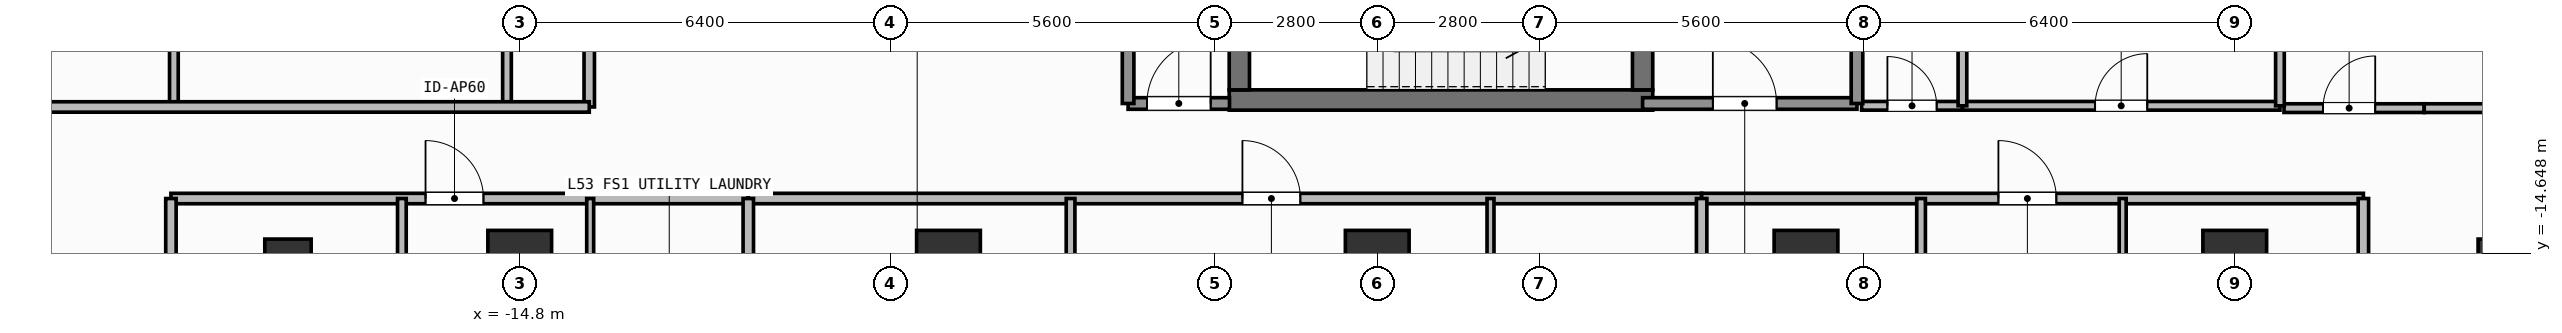
"""IFC4 building model, lengths in metres.
Left out: names, types, materials, properties, quantities, classifications, styles, units other than length and angle.
Written with IfcOpenShell. Run it as: python <this file> out.ifc"""

import sys

from ifc_helpers import new_model, si_unit, direction, frame, frame_2d, origin, origin_2d, place, context, subcontext, project, spatial, rectangle, hollow_rectangle, extrude, element, fill, save


model = new_model("IFC4")
c1 = context("Model", 3, precision=1e-05, world=origin(), true_north=direction((0.0, 1.0)))
c2 = subcontext(c1, "Body", "Model", "MODEL_VIEW")
j1 = project(units=[si_unit("LENGTHUNIT", "METRE"), si_unit("PLANEANGLEUNIT", "RADIAN")], contexts=[c1])
p1 = place(None, origin())
s1 = spatial("IfcSite", under=j1, at=p1, CompositionType="ELEMENT")
p2 = place(p1, origin())
s2 = spatial("IfcBuilding", under=s1, at=p2, CompositionType="ELEMENT")
p3 = place(p2, frame((0.0, 0.0, 215.7)))
s3 = spatial("IfcBuildingStorey", under=s2, at=p3, CompositionType="ELEMENT", Elevation=215.7)
p4 = place(p3, frame((-2.555, -12.0, 0.0), z_axis=(0.0, 0.0, 1.0), x_axis=(1.0, 0.0, 0.0)))
e1 = element("IfcWall", 1, at=p4, inside=s3, PredefinedType="SHEAR", context=c2, shape_type="SweptSolid", body=[
    extrude(rectangle(XDim=7.31, YDim=0.35, at=frame_2d((3.655, 0.0))), origin(), (0.0, 0.0, 1.0), 3.9),
])
p5 = place(p3, frame((-2.38, -11.825, 0.0), z_axis=(0.0, 0.0, 1.0), x_axis=(0.0, 1.0, 0.0)))
e2 = element("IfcWall", 2, at=p5, inside=s3, PredefinedType="SHEAR", context=c2, shape_type="SweptSolid", body=[
    extrude(rectangle(XDim=2.925, YDim=0.35, at=frame_2d((1.462, 0.0))), origin(), (0.0, 0.0, 1.0), 3.9),
])
p6 = place(p3, frame((4.58, -8.9, 0.0), z_axis=(0.0, 0.0, 1.0), x_axis=(0.0, -1.0, 0.0)))
e3 = element("IfcWall", 3, at=p6, inside=s3, PredefinedType="SHEAR", context=c2, shape_type="SweptSolid", body=[
    extrude(rectangle(XDim=2.925, YDim=0.35, at=frame_2d((1.462, 0.0))), origin(), (0.0, 0.0, 1.0), 3.9),
])
p7 = place(p6, frame((0.913, 0.0, 0.0)))
e4 = element("IfcOpeningElement", 4, at=p7, cuts=e3, PredefinedType="OPENING", context=c2, shape_type="SweptSolid", body=[
    extrude(rectangle(XDim=1.1, YDim=2.15, at=frame_2d((0.55, 1.075))), frame((0.0, 0.185, 0.0), z_axis=(0.0, -1.0, 0.0), x_axis=(1.0, 0.0, 0.0)), (0.0, 0.0, 1.0), 0.37),
])
for number, where, z_axis, x_axis in (
    (5, (-14.8, -14.8, 0.0), (0.0, 0.0, 1.0), (1.0, 0.0, 0.0)),
    (6, (-7.4, -14.8, 0.0), (0.0, 0.0, 1.0), (1.0, 0.0, 0.0)),
    (7, (0.0, -14.8, 0.0), (0.0, 0.0, 1.0), (1.0, 0.0, 0.0)),
    (8, (7.4, -14.8, 0.0), (0.0, 0.0, 1.0), (1.0, 0.0, 0.0)),
    (9, (14.8, -14.8, 0.0), (0.0, 0.0, 1.0), (1.0, 0.0, 0.0)),
):
    element("IfcColumn", number, at=place(p3, frame(where, z_axis=z_axis, x_axis=x_axis)), inside=s3, PredefinedType="COLUMN", context=c2, shape_type="SweptSolid", body=[
        extrude(rectangle(XDim=1.1, YDim=1.1, at=origin_2d()), origin(), (0.0, 0.0, 1.0), 3.9),
    ])
for number, where, z_axis, x_axis in (
    (10, (-18.8, -14.8, 0.0), (0.0, 0.0, 1.0), (1.0, 0.0, 0.0)),
    (11, (19.4, -14.8, 0.0), (0.0, 0.0, 1.0), (1.0, 0.0, 0.0)),
):
    element("IfcColumn", number, at=place(p3, frame(where, z_axis=z_axis, x_axis=x_axis)), inside=s3, PredefinedType="COLUMN", context=c2, shape_type="SweptSolid", body=[
        extrude(hollow_rectangle(XDim=0.8, YDim=0.8, WallThickness=0.036, at=origin_2d()), origin(), (0.0, 0.0, 1.0), 3.9),
    ])
p8 = place(p3, frame((4.58, -12.06, 0.0), z_axis=(0.0, 0.0, 1.0), x_axis=(1.0, 0.0, 0.0)))
e12 = element("IfcWall", 12, at=p8, inside=s3, PredefinedType="SOLIDWALL", context=c2, shape_type="SweptSolid", body=[
    extrude(rectangle(XDim=3.7, YDim=0.2, at=frame_2d((1.85, 0.0))), origin(), (0.0, 0.0, 1.0), 3.62),
])
p9 = place(p8, frame((1.212, 0.0, 0.0)))
e13 = element("IfcOpeningElement", 13, at=p9, cuts=e12, PredefinedType="OPENING", context=c2, shape_type="SweptSolid", body=[
    extrude(rectangle(XDim=1.1, YDim=2.15, at=frame_2d((0.55, 1.075))), frame((0.0, 0.11, 0.0), z_axis=(0.0, -1.0, 0.0), x_axis=(1.0, 0.0, 0.0)), (0.0, 0.0, 1.0), 0.22),
])
p10 = place(p3, frame((-4.3, -12.06, 0.0), z_axis=(0.0, 0.0, 1.0), x_axis=(1.0, 0.0, 0.0)))
e14 = element("IfcWall", 14, at=p10, inside=s3, PredefinedType="SOLIDWALL", context=c2, shape_type="SweptSolid", body=[
    extrude(rectangle(XDim=1.75, YDim=0.2, at=frame_2d((0.875, 0.0))), origin(), (0.0, 0.0, 1.0), 3.62),
])
p11 = place(p10, frame((0.325, 0.0, 0.0)))
e15 = element("IfcOpeningElement", 15, at=p11, cuts=e14, PredefinedType="OPENING", context=c2, shape_type="SweptSolid", body=[
    extrude(rectangle(XDim=1.1, YDim=2.15, at=frame_2d((0.55, 1.075))), frame((0.0, 0.11, 0.0), z_axis=(0.0, -1.0, 0.0), x_axis=(1.0, 0.0, 0.0)), (0.0, 0.0, 1.0), 0.22),
])
p12 = place(p3, frame((8.36, -12.1, 0.0), z_axis=(0.0, 0.0, 1.0), x_axis=(1.0, 0.0, 0.0)))
e16 = element("IfcWall", 16, at=p12, inside=s3, PredefinedType="PARTITIONING", context=c2, shape_type="SweptSolid", body=[
    extrude(rectangle(XDim=1.74, YDim=0.15, at=frame_2d((0.87, 0.0))), origin(), (0.0, 0.0, 1.0), 3.62),
])
p13 = place(p12, frame((0.445, 0.0, 0.0)))
e17 = element("IfcOpeningElement", 17, at=p13, cuts=e16, PredefinedType="OPENING", context=c2, shape_type="SweptSolid", body=[
    extrude(rectangle(XDim=0.85, YDim=2.1, at=frame_2d((0.425, 1.05))), frame((0.0, 0.085, 0.0), z_axis=(0.0, -1.0, 0.0), x_axis=(1.0, 0.0, 0.0)), (0.0, 0.0, 1.0), 0.17),
])
p14 = place(p3, frame((10.1, -12.1, 0.0), z_axis=(0.0, 0.0, 1.0), x_axis=(1.0, 0.0, 0.0)))
e18 = element("IfcWall", 18, at=p14, inside=s3, PredefinedType="PARTITIONING", context=c2, shape_type="SweptSolid", body=[
    extrude(rectangle(XDim=5.48, YDim=0.15, at=frame_2d((2.74, 0.0))), origin(), (0.0, 0.0, 1.0), 3.62),
])
p15 = place(p14, frame((2.29, 0.0, 0.0)))
e19 = element("IfcOpeningElement", 19, at=p15, cuts=e18, PredefinedType="OPENING", context=c2, shape_type="SweptSolid", body=[
    extrude(rectangle(XDim=0.9, YDim=2.1, at=frame_2d((0.45, 1.05))), frame((0.0, 0.085, 0.0), z_axis=(0.0, -1.0, 0.0), x_axis=(1.0, 0.0, 0.0)), (0.0, 0.0, 1.0), 0.17),
])
p16 = place(p3, frame((-20.82, -13.7, 0.0), z_axis=(0.0, 0.0, 1.0), x_axis=(1.0, 0.0, 0.0)))
e20 = element("IfcWall", 20, at=p16, inside=s3, PredefinedType="PARTITIONING", context=c2, shape_type="SweptSolid", body=[
    extrude(rectangle(XDim=9.965, YDim=0.18, at=frame_2d((4.982, 0.0))), origin(), (0.0, 0.0, 1.0), 3.62),
])
p17 = place(p16, frame((4.394, 0.0, 0.0)))
e21 = element("IfcOpeningElement", 21, at=p17, cuts=e20, PredefinedType="OPENING", context=c2, shape_type="SweptSolid", body=[
    extrude(rectangle(XDim=1.0, YDim=2.2, at=frame_2d((0.5, 1.1))), frame((0.0, 0.1, 0.0), z_axis=(0.0, -1.0, 0.0), x_axis=(1.0, 0.0, 0.0)), (0.0, 0.0, 1.0), 0.2),
])
p18 = place(p3, frame((-16.834, -24.39, 0.0), z_axis=(0.0, 0.0, 1.0), x_axis=(0.0, 1.0, 0.0)))
e22 = element("IfcWall", 22, at=p18, inside=s3, PredefinedType="PARTITIONING", context=c2, shape_type="SweptSolid", body=[
    extrude(rectangle(XDim=10.69, YDim=0.15, at=frame_2d((5.345, 0.0))), origin(), (0.0, 0.0, 1.0), 3.62),
])
p19 = place(p18, frame((4.83, 0.0, 0.0)))
e23 = element("IfcOpeningElement", 23, at=p19, cuts=e22, PredefinedType="OPENING", context=c2, shape_type="SweptSolid", body=[
    extrude(rectangle(XDim=0.85, YDim=2.1, at=frame_2d((0.425, 1.05))), frame((0.0, 0.085, 0.0), z_axis=(0.0, -1.0, 0.0), x_axis=(1.0, 0.0, 0.0)), (0.0, 0.0, 1.0), 0.17),
])
p20 = place(p3, frame((-13.584, -21.055, 0.0), z_axis=(0.0, 0.0, 1.0), x_axis=(0.0, 1.0, 0.0)))
e24 = element("IfcWall", 24, at=p20, inside=s3, PredefinedType="PARTITIONING", context=c2, shape_type="SweptSolid", body=[
    extrude(rectangle(XDim=7.355, YDim=0.12, at=frame_2d((3.677, 0.0))), origin(), (0.0, 0.0, 1.0), 3.62),
])
p21 = place(p20, frame((2.634, 0.0, 0.0)))
e25 = element("IfcOpeningElement", 25, at=p21, cuts=e24, PredefinedType="OPENING", context=c2, shape_type="SweptSolid", body=[
    extrude(rectangle(XDim=0.85, YDim=2.1, at=frame_2d((0.425, 1.05))), frame((0.0, 0.07, 0.0), z_axis=(0.0, -1.0, 0.0), x_axis=(1.0, 0.0, 0.0)), (0.0, 0.0, 1.0), 0.14),
])
p22 = place(p3, frame((-10.855, -13.7, 0.0), z_axis=(0.0, 0.0, 1.0), x_axis=(1.0, 0.0, 0.0)))
e26 = element("IfcWall", 26, at=p22, inside=s3, PredefinedType="PARTITIONING", context=c2, shape_type="SweptSolid", body=[
    extrude(rectangle(XDim=16.454, YDim=0.18, at=frame_2d((8.227, 0.0))), origin(), (0.0, 0.0, 1.0), 3.62),
])
p23 = place(p22, frame((8.528, 0.0, 0.0)))
e27 = element("IfcOpeningElement", 27, at=p23, cuts=e26, PredefinedType="OPENING", context=c2, shape_type="SweptSolid", body=[
    extrude(rectangle(XDim=1.0, YDim=2.2, at=frame_2d((0.5, 1.1))), frame((0.0, 0.1, 0.0), z_axis=(0.0, -1.0, 0.0), x_axis=(1.0, 0.0, 0.0)), (0.0, 0.0, 1.0), 0.2),
])
p24 = place(p3, frame((-5.293, -18.277, 0.0), z_axis=(0.0, 0.0, 1.0), x_axis=(0.0, 1.0, 0.0)))
e28 = element("IfcWall", 28, at=p24, inside=s3, PredefinedType="PARTITIONING", context=c2, shape_type="SweptSolid", body=[
    extrude(rectangle(XDim=4.577, YDim=0.15, at=frame_2d((2.289, 0.0))), origin(), (0.0, 0.0, 1.0), 3.62),
])
p25 = place(p24, frame((1.953, 0.0, 0.0)))
e29 = element("IfcOpeningElement", 29, at=p25, cuts=e28, PredefinedType="OPENING", context=c2, shape_type="SweptSolid", body=[
    extrude(rectangle(XDim=0.85, YDim=2.1, at=frame_2d((0.425, 1.05))), frame((0.0, 0.085, 0.0), z_axis=(0.0, -1.0, 0.0), x_axis=(1.0, 0.0, 0.0)), (0.0, 0.0, 1.0), 0.17),
])
p26 = place(p3, frame((1.955, -21.183, 0.0), z_axis=(0.0, 0.0, 1.0), x_axis=(0.0, 1.0, 0.0)))
e30 = element("IfcWall", 30, at=p26, inside=s3, PredefinedType="PARTITIONING", context=c2, shape_type="SweptSolid", body=[
    extrude(rectangle(XDim=7.483, YDim=0.12, at=frame_2d((3.742, 0.0))), origin(), (0.0, 0.0, 1.0), 3.62),
])
p27 = place(p26, frame((3.316, 0.0, 0.0)))
e31 = element("IfcOpeningElement", 31, at=p27, cuts=e30, PredefinedType="OPENING", context=c2, shape_type="SweptSolid", body=[
    extrude(rectangle(XDim=0.85, YDim=2.1, at=frame_2d((0.425, 1.05))), frame((0.0, 0.07, 0.0), z_axis=(0.0, -1.0, 0.0), x_axis=(1.0, 0.0, 0.0)), (0.0, 0.0, 1.0), 0.14),
])
p28 = place(p3, frame((5.599, -13.7, 0.0), z_axis=(0.0, 0.0, 1.0), x_axis=(1.0, 0.0, 0.0)))
e32 = element("IfcWall", 32, at=p28, inside=s3, PredefinedType="PARTITIONING", context=c2, shape_type="SweptSolid", body=[
    extrude(rectangle(XDim=11.421, YDim=0.18, at=frame_2d((5.71, 0.0))), origin(), (0.0, 0.0, 1.0), 3.62),
])
p29 = place(p28, frame((5.122, 0.0, 0.0)))
e33 = element("IfcOpeningElement", 33, at=p29, cuts=e32, PredefinedType="OPENING", context=c2, shape_type="SweptSolid", body=[
    extrude(rectangle(XDim=1.0, YDim=2.2, at=frame_2d((0.5, 1.1))), frame((0.0, 0.1, 0.0), z_axis=(0.0, -1.0, 0.0), x_axis=(1.0, 0.0, 0.0)), (0.0, 0.0, 1.0), 0.2),
])
p30 = place(p3, frame((9.386, -24.39, 0.0), z_axis=(0.0, 0.0, 1.0), x_axis=(0.0, 1.0, 0.0)))
e34 = element("IfcWall", 34, at=p30, inside=s3, PredefinedType="PARTITIONING", context=c2, shape_type="SweptSolid", body=[
    extrude(rectangle(XDim=10.69, YDim=0.15, at=frame_2d((5.345, 0.0))), origin(), (0.0, 0.0, 1.0), 3.62),
])
p31 = place(p30, frame((4.83, 0.0, 0.0)))
e35 = element("IfcOpeningElement", 35, at=p31, cuts=e34, PredefinedType="OPENING", context=c2, shape_type="SweptSolid", body=[
    extrude(rectangle(XDim=0.85, YDim=2.1, at=frame_2d((0.425, 1.05))), frame((0.0, 0.085, 0.0), z_axis=(0.0, -1.0, 0.0), x_axis=(1.0, 0.0, 0.0)), (0.0, 0.0, 1.0), 0.17),
])
p32 = place(p3, frame((12.866, -18.19, 0.0), z_axis=(0.0, 0.0, 1.0), x_axis=(0.0, 1.0, 0.0)))
e36 = element("IfcWall", 36, at=p32, inside=s3, PredefinedType="PARTITIONING", context=c2, shape_type="SweptSolid", body=[
    extrude(rectangle(XDim=4.49, YDim=0.12, at=frame_2d((2.245, 0.0))), origin(), (0.0, 0.0, 1.0), 3.62),
])
p33 = place(p32, frame((1.907, 0.0, 0.0)))
e37 = element("IfcOpeningElement", 37, at=p33, cuts=e36, PredefinedType="OPENING", context=c2, shape_type="SweptSolid", body=[
    extrude(rectangle(XDim=0.85, YDim=2.1, at=frame_2d((0.425, 1.05))), frame((0.0, 0.07, 0.0), z_axis=(0.0, -1.0, 0.0), x_axis=(1.0, 0.0, 0.0)), (0.0, 0.0, 1.0), 0.14),
])
p34 = place(p3, frame((-13.6, -12.12, 0.0), z_axis=(0.0, 0.0, 1.0), x_axis=(0.0, 1.0, 0.0)))
e38 = element("IfcWall", 38, at=p34, inside=s3, PredefinedType="PARTITIONING", context=c2, shape_type="SweptSolid", body=[
    extrude(rectangle(XDim=23.55, YDim=0.18, at=frame_2d((11.775, 0.0))), origin(), (0.0, 0.0, 1.0), 3.62),
])
p35 = place(p34, frame((11.454, 0.0, 0.0)))
e39 = element("IfcOpeningElement", 39, at=p35, cuts=e38, PredefinedType="OPENING", context=c2, shape_type="SweptSolid", body=[
    extrude(rectangle(XDim=1.0, YDim=2.2, at=frame_2d((0.5, 1.1))), frame((0.0, 0.1, 0.0), z_axis=(0.0, -1.0, 0.0), x_axis=(1.0, 0.0, 0.0)), (0.0, 0.0, 1.0), 0.2),
])
p36 = place(p3, frame((-15.02, -12.12, 0.0), z_axis=(0.0, 0.0, 1.0), x_axis=(0.0, 1.0, 0.0)))
e40 = element("IfcWall", 40, at=p36, inside=s3, PredefinedType="PARTITIONING", context=c2, shape_type="SweptSolid", body=[
    extrude(rectangle(XDim=6.711, YDim=0.15, at=frame_2d((3.355, 0.0))), origin(), (0.0, 0.0, 1.0), 3.62),
])
p37 = place(p36, frame((2.841, 0.0, 0.0)))
e41 = element("IfcOpeningElement", 41, at=p37, cuts=e40, PredefinedType="OPENING", context=c2, shape_type="SweptSolid", body=[
    extrude(rectangle(XDim=0.85, YDim=2.1, at=frame_2d((0.425, 1.05))), frame((0.0, 0.085, 0.0), z_axis=(0.0, -1.0, 0.0), x_axis=(1.0, 0.0, 0.0)), (0.0, 0.0, 1.0), 0.17),
])
p38 = place(p3, frame((15.65, -12.14, 0.0), z_axis=(0.0, 0.0, 1.0), x_axis=(1.0, 0.0, 0.0)))
e42 = element("IfcWall", 42, at=p38, inside=s3, PredefinedType="PARTITIONING", context=c2, shape_type="SweptSolid", body=[
    extrude(rectangle(XDim=2.42, YDim=0.15, at=frame_2d((1.21, 0.0))), origin(), (0.0, 0.0, 1.0), 3.62),
])
p39 = place(p38, frame((0.674, 0.0, 0.0)))
e43 = element("IfcOpeningElement", 43, at=p39, cuts=e42, PredefinedType="OPENING", context=c2, shape_type="SweptSolid", body=[
    extrude(rectangle(XDim=0.9, YDim=2.1, at=frame_2d((0.45, 1.05))), frame((0.0, 0.085, 0.0), z_axis=(0.0, -1.0, 0.0), x_axis=(1.0, 0.0, 0.0)), (0.0, 0.0, 1.0), 0.17),
])
for number, where, z_axis, x_axis in (
    (44, (8.28, -12.06, 0.0), (0.0, 0.0, 1.0), (0.0, 1.0, 0.0)),
    (45, (-4.3, -12.06, 0.0), (0.0, 0.0, 1.0), (0.0, 1.0, 0.0)),
):
    element("IfcWall", number, at=place(p3, frame(where, z_axis=z_axis, x_axis=x_axis)), inside=s3, PredefinedType="SOLIDWALL", context=c2, shape_type="SweptSolid", body=[
        extrude(rectangle(XDim=3.26, YDim=0.2, at=frame_2d((1.63, 0.0))), origin(), (0.0, 0.0, 1.0), 3.62),
    ])
p40 = place(p3, frame((10.1, -12.1, 0.0), z_axis=(0.0, 0.0, 1.0), x_axis=(0.0, 1.0, 0.0)))
e46 = element("IfcWall", 46, at=p40, inside=s3, PredefinedType="PARTITIONING", context=c2, shape_type="SweptSolid", body=[
    extrude(rectangle(XDim=2.35, YDim=0.15, at=frame_2d((1.175, 0.0))), origin(), (0.0, 0.0, 1.0), 3.62),
])
p41 = place(p3, frame((15.58, -12.1, 0.0), z_axis=(0.0, 0.0, 1.0), x_axis=(0.0, 1.0, 0.0)))
e47 = element("IfcWall", 47, at=p41, inside=s3, PredefinedType="PARTITIONING", context=c2, shape_type="SweptSolid", body=[
    extrude(rectangle(XDim=6.25, YDim=0.15, at=frame_2d((3.125, 0.0))), origin(), (0.0, 0.0, 1.0), 3.62),
])
for number, where, z_axis, x_axis in (
    (48, (-10.855, -28.63, 0.0), (0.0, 0.0, 1.0), (0.0, 1.0, 0.0)),
    (49, (5.599, -28.63, 0.0), (0.0, 0.0, 1.0), (0.0, 1.0, 0.0)),
):
    element("IfcWall", number, at=place(p3, frame(where, z_axis=z_axis, x_axis=x_axis)), inside=s3, PredefinedType="PARTITIONING", context=c2, shape_type="SweptSolid", body=[
        extrude(rectangle(XDim=14.93, YDim=0.18, at=frame_2d((7.465, 0.0))), origin(), (0.0, 0.0, 1.0), 3.62),
    ])
for number, where, z_axis, x_axis in (
    (50, (-20.82, -27.51, 0.0), (0.0, 0.0, 1.0), (0.0, 1.0, 0.0)),
    (51, (17.02, -27.51, 0.0), (0.0, 0.0, 1.0), (0.0, 1.0, 0.0)),
):
    element("IfcWall", number, at=place(p3, frame(where, z_axis=z_axis, x_axis=x_axis)), inside=s3, PredefinedType="PARTITIONING", context=c2, shape_type="SweptSolid", body=[
        extrude(rectangle(XDim=13.81, YDim=0.18, at=frame_2d((6.905, 0.0))), origin(), (0.0, 0.0, 1.0), 3.62),
    ])
p42 = place(p3, frame((-20.769, -12.12, 0.0), z_axis=(0.0, 0.0, 1.0), x_axis=(0.0, 1.0, 0.0)))
e52 = element("IfcWall", 52, at=p42, inside=s3, PredefinedType="PARTITIONING", context=c2, shape_type="SweptSolid", body=[
    extrude(rectangle(XDim=6.711, YDim=0.15, at=frame_2d((3.355, 0.0))), origin(), (0.0, 0.0, 1.0), 3.62),
])
p43 = place(p3, frame((-24.13, -12.12, 0.0), z_axis=(0.0, 0.0, 1.0), x_axis=(1.0, 0.0, 0.0)))
e53 = element("IfcWall", 53, at=p43, inside=s3, PredefinedType="PARTITIONING", context=c2, shape_type="SweptSolid", body=[
    extrude(rectangle(XDim=10.53, YDim=0.18, at=frame_2d((5.265, 0.0))), origin(), (0.0, 0.0, 1.0), 3.62),
])
p44 = place(p3, frame((18.07, -12.14, 0.0), z_axis=(0.0, 0.0, 1.0), x_axis=(1.0, 0.0, 0.0)))
e54 = element("IfcWall", 54, at=p44, inside=s3, PredefinedType="PARTITIONING", context=c2, shape_type="SweptSolid", body=[
    extrude(rectangle(XDim=2.26, YDim=0.15, at=frame_2d((1.13, 0.0))), origin(), (0.0, 0.0, 1.0), 3.62),
])
p45 = place(p9, origin())
e55 = element("IfcDoor", 55, at=p45, inside=s3, OperationType="SINGLE_SWING_LEFT", PredefinedType="DOOR", context=c2, shape_type="SweptSolid", body=[
    extrude(rectangle(XDim=1.1, YDim=2.15, at=frame_2d((0.55, 1.075))), frame((0.0, 0.025, 0.0), z_axis=(0.0, -1.0, 0.0), x_axis=(1.0, 0.0, 0.0)), (0.0, 0.0, 1.0), 0.05),
])
fill(e13, e55)
p46 = place(p11, origin())
e56 = element("IfcDoor", 56, at=p46, inside=s3, OperationType="SINGLE_SWING_RIGHT", PredefinedType="DOOR", context=c2, shape_type="SweptSolid", body=[
    extrude(rectangle(XDim=1.1, YDim=2.15, at=frame_2d((0.55, 1.075))), frame((0.0, 0.025, 0.0), z_axis=(0.0, -1.0, 0.0), x_axis=(1.0, 0.0, 0.0)), (0.0, 0.0, 1.0), 0.05),
])
fill(e15, e56)
p47 = place(p13, origin())
e57 = element("IfcDoor", 57, at=p47, inside=s3, OperationType="SINGLE_SWING_LEFT", PredefinedType="DOOR", context=c2, shape_type="SweptSolid", body=[
    extrude(rectangle(XDim=0.85, YDim=2.1, at=frame_2d((0.425, 1.05))), frame((0.0, 0.025, 0.0), z_axis=(0.0, -1.0, 0.0), x_axis=(1.0, 0.0, 0.0)), (0.0, 0.0, 1.0), 0.05),
])
fill(e17, e57)
p48 = place(p15, origin())
e58 = element("IfcDoor", 58, at=p48, inside=s3, OperationType="SINGLE_SWING_RIGHT", PredefinedType="DOOR", context=c2, shape_type="SweptSolid", body=[
    extrude(rectangle(XDim=0.9, YDim=2.1, at=frame_2d((0.45, 1.05))), frame((0.0, 0.025, 0.0), z_axis=(0.0, -1.0, 0.0), x_axis=(1.0, 0.0, 0.0)), (0.0, 0.0, 1.0), 0.05),
])
fill(e19, e58)
p49 = place(p17, origin())
e59 = element("IfcDoor", 59, at=p49, inside=s3, OperationType="SINGLE_SWING_LEFT", PredefinedType="DOOR", context=c2, shape_type="SweptSolid", body=[
    extrude(rectangle(XDim=1.0, YDim=2.2, at=frame_2d((0.5, 1.1))), frame((0.0, 0.025, 0.0), z_axis=(0.0, -1.0, 0.0), x_axis=(1.0, 0.0, 0.0)), (0.0, 0.0, 1.0), 0.05),
])
fill(e21, e59)
p50 = place(p23, origin())
e60 = element("IfcDoor", 60, at=p50, inside=s3, OperationType="SINGLE_SWING_LEFT", PredefinedType="DOOR", context=c2, shape_type="SweptSolid", body=[
    extrude(rectangle(XDim=1.0, YDim=2.2, at=frame_2d((0.5, 1.1))), frame((0.0, 0.025, 0.0), z_axis=(0.0, -1.0, 0.0), x_axis=(1.0, 0.0, 0.0)), (0.0, 0.0, 1.0), 0.05),
])
fill(e27, e60)
p51 = place(p29, origin())
e61 = element("IfcDoor", 61, at=p51, inside=s3, OperationType="SINGLE_SWING_LEFT", PredefinedType="DOOR", context=c2, shape_type="SweptSolid", body=[
    extrude(rectangle(XDim=1.0, YDim=2.2, at=frame_2d((0.5, 1.1))), frame((0.0, 0.025, 0.0), z_axis=(0.0, -1.0, 0.0), x_axis=(1.0, 0.0, 0.0)), (0.0, 0.0, 1.0), 0.05),
])
fill(e33, e61)
p52 = place(p39, origin())
e62 = element("IfcDoor", 62, at=p52, inside=s3, OperationType="SINGLE_SWING_RIGHT", PredefinedType="DOOR", context=c2, shape_type="SweptSolid", body=[
    extrude(rectangle(XDim=0.9, YDim=2.1, at=frame_2d((0.45, 1.05))), frame((0.0, 0.025, 0.0), z_axis=(0.0, -1.0, 0.0), x_axis=(1.0, 0.0, 0.0)), (0.0, 0.0, 1.0), 0.05),
])
fill(e43, e62)
save(model, sys.argv[1])
